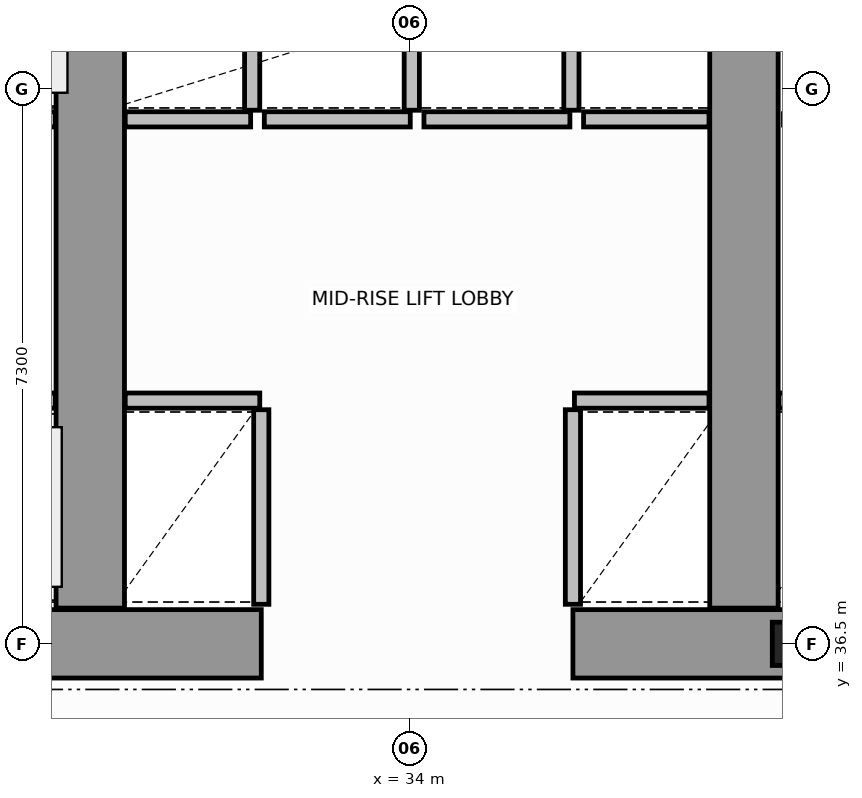
"""IFC4 building model, lengths in metres.
Left out: names, types, materials, properties, quantities, classifications, styles, units other than length and angle.
Written with IfcOpenShell. Run it as: python <this file> out.ifc"""

import sys

from ifc_helpers import new_model, si_unit, direction, frame, frame_2d, origin, origin_2d, place, context, subcontext, project, spatial, rectangle, i_section, extrude, source, transform, mapped, element, save


model = new_model("IFC4")
c1 = context("Model", 3, precision=1e-05, world=origin(), true_north=direction((0.0, 1.0)))
c2 = subcontext(c1, "Body", "Model", "MODEL_VIEW")
j1 = project(units=[si_unit("LENGTHUNIT", "METRE"), si_unit("PLANEANGLEUNIT", "RADIAN")], contexts=[c1])
p1 = place(None, origin())
s1 = spatial("IfcSite", under=j1, at=p1, CompositionType="ELEMENT")
p2 = place(p1, origin())
s2 = spatial("IfcBuilding", under=s1, at=p2, CompositionType="ELEMENT")
p3 = place(p2, frame((0.0, 0.0, 68.2)))
s3 = spatial("IfcBuildingStorey", under=s2, at=p3, CompositionType="ELEMENT", Elevation=68.2)
m1 = source(origin(), c2, "Body", "SweptSolid", [
    extrude(i_section(OverallWidth=0.454, OverallDepth=0.569, WebThickness=0.078, FlangeThickness=0.08, FilletRadius=0.015, at=origin_2d()), origin(), (0.0, 0.0, 1.0), 3.8),
])
p4 = place(p3, frame((39.0, 36.5, 0.0), z_axis=(0.0, 0.0, 1.0), x_axis=(1.0, 0.0, 0.0)))
e1 = element("IfcColumn", 1, at=p4, inside=s3, PredefinedType="COLUMN", context=c2, shape_type="MappedRepresentation", body=[
    mapped(m1, transform((0.0, 0.0, 0.0), scale=1.0)),
])
for number, where, z_axis, x_axis in (
    (2, (27.55, 36.5, 0.0), (0.0, 0.0, 1.0), (1.0, 0.0, 0.0)),
    (3, (36.15, 36.5, 0.0), (0.0, 0.0, 1.0), (1.0, 0.0, 0.0)),
):
    element("IfcWall", number, at=place(p3, frame(where, z_axis=z_axis, x_axis=x_axis)), inside=s3, PredefinedType="SHEAR", context=c2, shape_type="SweptSolid", body=[
        extrude(rectangle(XDim=4.5, YDim=0.9, at=frame_2d((2.25, 0.0))), origin(), (0.0, 0.0, 1.0), 3.8),
    ])
for number, where, z_axis, x_axis in (
    (4, (29.8, 36.97, 0.0), (0.0, 0.0, 1.0), (0.0, 1.0, 0.0)),
    (5, (38.4, 36.97, 0.0), (0.0, 0.0, 1.0), (0.0, 1.0, 0.0)),
):
    element("IfcWall", number, at=place(p3, frame(where, z_axis=z_axis, x_axis=x_axis)), inside=s3, PredefinedType="SHEAR", context=c2, shape_type="SweptSolid", body=[
        extrude(rectangle(XDim=9.23, YDim=0.9, at=frame_2d((4.615, 0.0))), origin(), (0.0, 0.0, 1.0), 3.8),
    ])
p5 = place(p3, frame((27.57, 39.7, 0.0), z_axis=(0.0, 0.0, 1.0), x_axis=(1.0, 0.0, 0.0)))
e6 = element("IfcWall", 6, at=p5, inside=s3, PredefinedType="SOLIDWALL", context=c2, shape_type="SweptSolid", body=[
    extrude(rectangle(XDim=1.77, YDim=0.2, at=frame_2d((0.885, 0.0))), origin(), (0.0, 0.0, 1.0), 3.58),
])
p6 = place(p5, frame((0.335, 0.0, 0.0)))
e7 = element("IfcOpeningElement", 7, at=p6, cuts=e6, PredefinedType="OPENING", context=c2, shape_type="SweptSolid", body=[
    extrude(rectangle(XDim=1.1, YDim=2.15, at=frame_2d((0.55, 1.075))), frame((0.0, 0.11, 0.0), z_axis=(0.0, -1.0, 0.0), x_axis=(1.0, 0.0, 0.0)), (0.0, 0.0, 1.0), 0.22),
])
p7 = place(p3, frame((27.69, 43.4, 0.0), z_axis=(0.0, 0.0, 1.0), x_axis=(1.0, 0.0, 0.0)))
e8 = element("IfcWall", 8, at=p7, inside=s3, PredefinedType="SOLIDWALL", context=c2, shape_type="SweptSolid", body=[
    extrude(rectangle(XDim=1.65, YDim=0.2, at=frame_2d((0.825, 0.0))), origin(), (0.0, 0.0, 1.0), 3.58),
])
p8 = place(p7, frame((0.275, 0.0, 0.0)))
e9 = element("IfcOpeningElement", 9, at=p8, cuts=e8, PredefinedType="OPENING", context=c2, shape_type="SweptSolid", body=[
    extrude(rectangle(XDim=1.1, YDim=2.15, at=frame_2d((0.55, 1.075))), frame((0.0, 0.11, 0.0), z_axis=(0.0, -1.0, 0.0), x_axis=(1.0, 0.0, 0.0)), (0.0, 0.0, 1.0), 0.22),
])
p9 = place(p3, frame((30.26, 39.7, 0.0), z_axis=(0.0, 0.0, 1.0), x_axis=(1.0, 0.0, 0.0)))
e10 = element("IfcWall", 10, at=p9, inside=s3, PredefinedType="SOLIDWALL", context=c2, shape_type="SweptSolid", body=[
    extrude(rectangle(XDim=1.77, YDim=0.2, at=frame_2d((0.885, 0.0))), origin(), (0.0, 0.0, 1.0), 3.58),
])
p10 = place(p3, frame((32.05, 37.02, 0.0), z_axis=(0.0, 0.0, 1.0), x_axis=(0.0, 1.0, 0.0)))
e11 = element("IfcWall", 11, at=p10, inside=s3, PredefinedType="SOLIDWALL", context=c2, shape_type="SweptSolid", body=[
    extrude(rectangle(XDim=2.56, YDim=0.2, at=frame_2d((1.28, 0.0))), origin(), (0.0, 0.0, 1.0), 3.58),
])
p11 = place(p3, frame((36.17, 39.7, 0.0), z_axis=(0.0, 0.0, 1.0), x_axis=(1.0, 0.0, 0.0)))
e12 = element("IfcWall", 12, at=p11, inside=s3, PredefinedType="SOLIDWALL", context=c2, shape_type="SweptSolid", body=[
    extrude(rectangle(XDim=1.77, YDim=0.2, at=frame_2d((0.885, 0.0))), origin(), (0.0, 0.0, 1.0), 3.58),
])
p12 = place(p3, frame((36.15, 37.02, 0.0), z_axis=(0.0, 0.0, 1.0), x_axis=(0.0, 1.0, 0.0)))
e13 = element("IfcWall", 13, at=p12, inside=s3, PredefinedType="SOLIDWALL", context=c2, shape_type="SweptSolid", body=[
    extrude(rectangle(XDim=2.56, YDim=0.2, at=frame_2d((1.28, 0.0))), origin(), (0.0, 0.0, 1.0), 3.58),
])
p13 = place(p3, frame((30.26, 43.4, 0.0), z_axis=(0.0, 0.0, 1.0), x_axis=(1.0, 0.0, 0.0)))
e14 = element("IfcWall", 14, at=p13, inside=s3, PredefinedType="SOLIDWALL", context=c2, shape_type="SweptSolid", body=[
    extrude(rectangle(XDim=1.65, YDim=0.2, at=frame_2d((0.825, 0.0))), origin(), (0.0, 0.0, 1.0), 3.58),
])
p14 = place(p3, frame((31.93, 43.52, 0.0), z_axis=(0.0, 0.0, 1.0), x_axis=(0.0, 1.0, 0.0)))
e15 = element("IfcWall", 15, at=p14, inside=s3, PredefinedType="SOLIDWALL", context=c2, shape_type="SweptSolid", body=[
    extrude(rectangle(XDim=2.56, YDim=0.2, at=frame_2d((1.28, 0.0))), origin(), (0.0, 0.0, 1.0), 3.58),
])
p15 = place(p3, frame((32.09, 43.4, 0.0), z_axis=(0.0, 0.0, 1.0), x_axis=(1.0, 0.0, 0.0)))
e16 = element("IfcWall", 16, at=p15, inside=s3, PredefinedType="SOLIDWALL", context=c2, shape_type="SweptSolid", body=[
    extrude(rectangle(XDim=1.92, YDim=0.2, at=frame_2d((0.96, 0.0))), origin(), (0.0, 0.0, 1.0), 3.58),
])
p16 = place(p3, frame((34.03, 43.52, 0.0), z_axis=(0.0, 0.0, 1.0), x_axis=(0.0, 1.0, 0.0)))
e17 = element("IfcWall", 17, at=p16, inside=s3, PredefinedType="SOLIDWALL", context=c2, shape_type="SweptSolid", body=[
    extrude(rectangle(XDim=2.56, YDim=0.2, at=frame_2d((1.28, 0.0))), origin(), (0.0, 0.0, 1.0), 3.58),
])
p17 = place(p3, frame((34.19, 43.4, 0.0), z_axis=(0.0, 0.0, 1.0), x_axis=(1.0, 0.0, 0.0)))
e18 = element("IfcWall", 18, at=p17, inside=s3, PredefinedType="SOLIDWALL", context=c2, shape_type="SweptSolid", body=[
    extrude(rectangle(XDim=1.92, YDim=0.2, at=frame_2d((0.96, 0.0))), origin(), (0.0, 0.0, 1.0), 3.58),
])
p18 = place(p3, frame((36.13, 43.52, 0.0), z_axis=(0.0, 0.0, 1.0), x_axis=(0.0, 1.0, 0.0)))
e19 = element("IfcWall", 19, at=p18, inside=s3, PredefinedType="SOLIDWALL", context=c2, shape_type="SweptSolid", body=[
    extrude(rectangle(XDim=2.56, YDim=0.2, at=frame_2d((1.28, 0.0))), origin(), (0.0, 0.0, 1.0), 3.58),
])
p19 = place(p3, frame((36.29, 43.4, 0.0), z_axis=(0.0, 0.0, 1.0), x_axis=(1.0, 0.0, 0.0)))
e20 = element("IfcWall", 20, at=p19, inside=s3, PredefinedType="SOLIDWALL", context=c2, shape_type="SweptSolid", body=[
    extrude(rectangle(XDim=1.65, YDim=0.2, at=frame_2d((0.825, 0.0))), origin(), (0.0, 0.0, 1.0), 3.58),
])
p20 = place(p3, frame((38.86, 39.7, 0.0), z_axis=(0.0, 0.0, 1.0), x_axis=(1.0, 0.0, 0.0)))
e21 = element("IfcWall", 21, at=p20, inside=s3, PredefinedType="SOLIDWALL", context=c2, shape_type="SweptSolid", body=[
    extrude(rectangle(XDim=1.77, YDim=0.2, at=frame_2d((0.885, 0.0))), origin(), (0.0, 0.0, 1.0), 3.58),
])
save(model, sys.argv[1])
